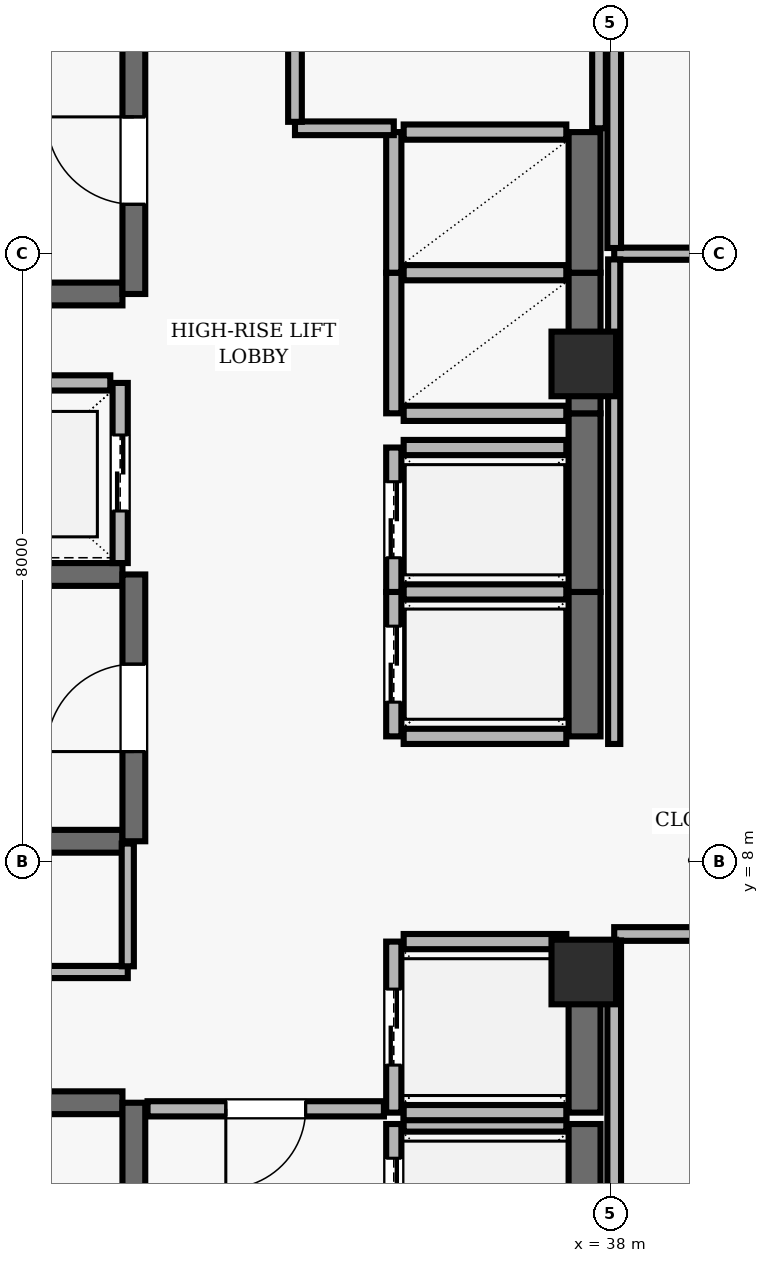
"""IFC4 building model, lengths in metres.
Left out: names, types, materials, properties, quantities, classifications, styles, units other than length and angle.
Written with IfcOpenShell. Run it as: python <this file> out.ifc"""

import sys

from ifc_helpers import new_model, si_unit, direction, frame, frame_2d, origin, origin_2d, place, context, subcontext, project, spatial, rectangle, extrude, element, fill, save


model = new_model("IFC4")
c1 = context("Model", 3, precision=1e-05, world=origin(), true_north=direction((0.0, 1.0)))
c2 = subcontext(c1, "Body", "Model", "MODEL_VIEW")
j1 = project(units=[si_unit("LENGTHUNIT", "METRE"), si_unit("PLANEANGLEUNIT", "RADIAN")], contexts=[c1])
p1 = place(None, origin())
s1 = spatial("IfcSite", under=j1, at=p1, CompositionType="ELEMENT")
p2 = place(p1, origin())
s2 = spatial("IfcBuilding", under=s1, at=p2, CompositionType="ELEMENT")
p3 = place(p2, frame((0.0, 0.0, 259.9)))
s3 = spatial("IfcBuildingStorey", under=s2, at=p3, CompositionType="ELEMENT", Elevation=259.9)
for number, where, z_axis, x_axis in (
    (1, (37.65, 6.55, 0.0), (0.0, 0.0, 1.0), (1.0, 0.0, 0.0)),
    (2, (37.65, 14.55, 0.0), (0.0, 0.0, 1.0), (1.0, 0.0, 0.0)),
):
    element("IfcColumn", number, at=place(p3, frame(where, z_axis=z_axis, x_axis=x_axis)), inside=s3, PredefinedType="COLUMN", context=c2, shape_type="SweptSolid", body=[
        extrude(rectangle(XDim=0.85, YDim=0.85, at=origin_2d()), origin(), (0.0, 0.0, 1.0), 3.9),
    ])
p4 = place(p3, frame((31.58, 4.83, 0.0), z_axis=(0.0, 0.0, 1.0), x_axis=(-1.0, 0.0, 0.0)))
e3 = element("IfcWall", 3, at=p4, inside=s3, PredefinedType="SHEAR", context=c2, shape_type="SweptSolid", body=[
    extrude(rectangle(XDim=8.36, YDim=0.3, at=frame_2d((4.18, 0.0))), origin(), (0.0, 0.0, 1.0), 3.69),
])
p5 = place(p3, frame((31.73, 0.96, 0.0), z_axis=(0.0, 0.0, 1.0), x_axis=(0.0, 1.0, 0.0)))
e4 = element("IfcWall", 4, at=p5, inside=s3, PredefinedType="SHEAR", context=c2, shape_type="SweptSolid", body=[
    extrude(rectangle(XDim=3.87, YDim=0.3, at=frame_2d((1.935, 0.0))), origin(), (0.0, 0.0, 1.0), 3.69),
])
p6 = place(p5, frame((1.54, 0.0, 0.0)))
e5 = element("IfcOpeningElement", 5, at=p6, cuts=e4, PredefinedType="OPENING", context=c2, shape_type="SweptSolid", body=[
    extrude(rectangle(XDim=1.15, YDim=2.15, at=frame_2d((0.575, 1.075))), frame((0.0, 0.16, 0.0), z_axis=(0.0, -1.0, 0.0), x_axis=(1.0, 0.0, 0.0)), (0.0, 0.0, 1.0), 0.32),
])
p7 = place(p3, frame((23.22, 15.47, 0.0), z_axis=(0.0, 0.0, 1.0), x_axis=(1.0, 0.0, 0.0)))
e6 = element("IfcWall", 6, at=p7, inside=s3, PredefinedType="SHEAR", context=c2, shape_type="SweptSolid", body=[
    extrude(rectangle(XDim=8.36, YDim=0.3, at=frame_2d((4.18, 0.0))), origin(), (0.0, 0.0, 1.0), 3.69),
])
p8 = place(p3, frame((31.73, 15.47, 0.0), z_axis=(0.0, 0.0, 1.0), x_axis=(0.0, 1.0, 0.0)))
e7 = element("IfcWall", 7, at=p8, inside=s3, PredefinedType="SHEAR", context=c2, shape_type="SweptSolid", body=[
    extrude(rectangle(XDim=3.51, YDim=0.3, at=frame_2d((1.755, 0.0))), origin(), (0.0, 0.0, 1.0), 3.69),
])
p9 = place(p8, frame((1.18, 0.0, 0.0)))
e8 = element("IfcOpeningElement", 8, at=p9, cuts=e7, PredefinedType="OPENING", context=c2, shape_type="SweptSolid", body=[
    extrude(rectangle(XDim=1.15, YDim=2.15, at=frame_2d((0.575, 1.075))), frame((0.0, 0.16, 0.0), z_axis=(0.0, -1.0, 0.0), x_axis=(1.0, 0.0, 0.0)), (0.0, 0.0, 1.0), 0.32),
])
for number, where, z_axis, x_axis in (
    (9, (31.58, 11.78, 0.0), (0.0, 0.0, 1.0), (-1.0, 0.0, 0.0)),
    (10, (23.22, 8.27, 0.0), (0.0, 0.0, 1.0), (1.0, 0.0, 0.0)),
):
    element("IfcWall", number, at=place(p3, frame(where, z_axis=z_axis, x_axis=x_axis)), inside=s3, PredefinedType="SHEAR", context=c2, shape_type="SweptSolid", body=[
        extrude(rectangle(XDim=8.36, YDim=0.3, at=frame_2d((4.18, 0.0))), origin(), (0.0, 0.0, 1.0), 3.69),
    ])
p10 = place(p3, frame((31.73, 8.27, 0.0), z_axis=(0.0, 0.0, 1.0), x_axis=(0.0, 1.0, 0.0)))
e11 = element("IfcWall", 11, at=p10, inside=s3, PredefinedType="SHEAR", context=c2, shape_type="SweptSolid", body=[
    extrude(rectangle(XDim=3.51, YDim=0.3, at=frame_2d((1.755, 0.0))), origin(), (0.0, 0.0, 1.0), 3.69),
])
p11 = place(p10, frame((1.18, 0.0, 0.0)))
e12 = element("IfcOpeningElement", 12, at=p11, cuts=e11, PredefinedType="OPENING", context=c2, shape_type="SweptSolid", body=[
    extrude(rectangle(XDim=1.15, YDim=2.15, at=frame_2d((0.575, 1.075))), frame((0.0, 0.16, 0.0), z_axis=(0.0, -1.0, 0.0), x_axis=(1.0, 0.0, 0.0)), (0.0, 0.0, 1.0), 0.32),
])
p12 = place(p3, frame((35.15, 4.55, 0.0), z_axis=(0.0, 0.0, 1.0), x_axis=(0.0, -1.0, 0.0)))
e13 = element("IfcWall", 13, at=p12, inside=s3, PredefinedType="SOLIDWALL", context=c2, shape_type="SweptSolid", body=[
    extrude(rectangle(XDim=2.1, YDim=0.2, at=frame_2d((1.05, 0.0))), origin(), (0.0, 0.0, 1.0), 3.69),
])
p13 = place(p12, frame((0.45, 0.0, 0.0)))
e14 = element("IfcOpeningElement", 14, at=p13, cuts=e13, PredefinedType="OPENING", context=c2, shape_type="SweptSolid", body=[
    extrude(rectangle(XDim=1.2, YDim=2.15, at=frame_2d((0.6, 1.075))), frame((0.0, 0.11, 0.0), z_axis=(0.0, -1.0, 0.0), x_axis=(1.0, 0.0, 0.0)), (0.0, 0.0, 1.0), 0.22),
])
p14 = place(p3, frame((37.66, 2.45, 0.0), z_axis=(0.0, 0.0, 1.0), x_axis=(0.0, 1.0, 0.0)))
e15 = element("IfcWall", 15, at=p14, inside=s3, PredefinedType="SHEAR", context=c2, shape_type="SweptSolid", body=[
    extrude(rectangle(XDim=2.1, YDim=0.42, at=frame_2d((1.05, 0.0))), origin(), (0.0, 0.0, 1.0), 3.69),
])
p15 = place(p3, frame((37.42, 4.55, 0.0), z_axis=(0.0, 0.0, 1.0), x_axis=(-1.0, 0.0, 0.0)))
e16 = element("IfcWall", 16, at=p15, inside=s3, PredefinedType="SOLIDWALL", context=c2, shape_type="SweptSolid", body=[
    extrude(rectangle(XDim=2.14, YDim=0.2, at=frame_2d((1.07, 0.0))), origin(), (0.0, 0.0, 1.0), 3.69),
])
p16 = place(p3, frame((35.15, 6.95, 0.0), z_axis=(0.0, 0.0, 1.0), x_axis=(0.0, -1.0, 0.0)))
e17 = element("IfcWall", 17, at=p16, inside=s3, PredefinedType="SOLIDWALL", context=c2, shape_type="SweptSolid", body=[
    extrude(rectangle(XDim=2.25, YDim=0.2, at=frame_2d((1.125, 0.0))), origin(), (0.0, 0.0, 1.0), 3.69),
])
p17 = place(p16, frame((0.625, 0.0, 0.0)))
e18 = element("IfcOpeningElement", 18, at=p17, cuts=e17, PredefinedType="OPENING", context=c2, shape_type="SweptSolid", body=[
    extrude(rectangle(XDim=1.0, YDim=2.1, at=frame_2d((0.5, 1.05))), frame((0.0, 0.11, 0.0), z_axis=(0.0, -1.0, 0.0), x_axis=(1.0, 0.0, 0.0)), (0.0, 0.0, 1.0), 0.22),
])
p18 = place(p3, frame((37.66, 4.7, 0.0), z_axis=(0.0, 0.0, 1.0), x_axis=(0.0, 1.0, 0.0)))
e19 = element("IfcWall", 19, at=p18, inside=s3, PredefinedType="SHEAR", context=c2, shape_type="SweptSolid", body=[
    extrude(rectangle(XDim=2.25, YDim=0.42, at=frame_2d((1.125, 0.0))), origin(), (0.0, 0.0, 1.0), 3.69),
])
for number, where, z_axis, x_axis in (
    (20, (35.28, 4.7, 0.0), (0.0, 0.0, 1.0), (1.0, 0.0, 0.0)),
    (21, (37.42, 6.95, 0.0), (0.0, 0.0, 1.0), (-1.0, 0.0, 0.0)),
):
    element("IfcWall", number, at=place(p3, frame(where, z_axis=z_axis, x_axis=x_axis)), inside=s3, PredefinedType="SOLIDWALL", context=c2, shape_type="SweptSolid", body=[
        extrude(rectangle(XDim=2.14, YDim=0.2, at=frame_2d((1.07, 0.0))), origin(), (0.0, 0.0, 1.0), 3.69),
    ])
p19 = place(p3, frame((35.15, 11.55, 0.0), z_axis=(0.0, 0.0, 1.0), x_axis=(0.0, -1.0, 0.0)))
e22 = element("IfcWall", 22, at=p19, inside=s3, PredefinedType="SOLIDWALL", context=c2, shape_type="SweptSolid", body=[
    extrude(rectangle(XDim=1.9, YDim=0.2, at=frame_2d((0.95, 0.0))), origin(), (0.0, 0.0, 1.0), 3.69),
])
p20 = place(p19, frame((0.45, 0.0, 0.0)))
e23 = element("IfcOpeningElement", 23, at=p20, cuts=e22, PredefinedType="OPENING", context=c2, shape_type="SweptSolid", body=[
    extrude(rectangle(XDim=1.0, YDim=2.1, at=frame_2d((0.5, 1.05))), frame((0.0, 0.11, 0.0), z_axis=(0.0, -1.0, 0.0), x_axis=(1.0, 0.0, 0.0)), (0.0, 0.0, 1.0), 0.22),
])
p21 = place(p3, frame((37.66, 9.65, 0.0), z_axis=(0.0, 0.0, 1.0), x_axis=(0.0, 1.0, 0.0)))
e24 = element("IfcWall", 24, at=p21, inside=s3, PredefinedType="SHEAR", context=c2, shape_type="SweptSolid", body=[
    extrude(rectangle(XDim=1.9, YDim=0.42, at=frame_2d((0.95, 0.0))), origin(), (0.0, 0.0, 1.0), 3.69),
])
for number, where, z_axis, x_axis in (
    (25, (35.28, 9.65, 0.0), (0.0, 0.0, 1.0), (1.0, 0.0, 0.0)),
    (26, (37.42, 11.55, 0.0), (0.0, 0.0, 1.0), (-1.0, 0.0, 0.0)),
):
    element("IfcWall", number, at=place(p3, frame(where, z_axis=z_axis, x_axis=x_axis)), inside=s3, PredefinedType="SOLIDWALL", context=c2, shape_type="SweptSolid", body=[
        extrude(rectangle(XDim=2.14, YDim=0.2, at=frame_2d((1.07, 0.0))), origin(), (0.0, 0.0, 1.0), 3.69),
    ])
p22 = place(p3, frame((35.15, 13.45, 0.0), z_axis=(0.0, 0.0, 1.0), x_axis=(0.0, -1.0, 0.0)))
e27 = element("IfcWall", 27, at=p22, inside=s3, PredefinedType="SOLIDWALL", context=c2, shape_type="SweptSolid", body=[
    extrude(rectangle(XDim=1.9, YDim=0.2, at=frame_2d((0.95, 0.0))), origin(), (0.0, 0.0, 1.0), 3.69),
])
p23 = place(p22, frame((0.45, 0.0, 0.0)))
e28 = element("IfcOpeningElement", 28, at=p23, cuts=e27, PredefinedType="OPENING", context=c2, shape_type="SweptSolid", body=[
    extrude(rectangle(XDim=1.0, YDim=2.1, at=frame_2d((0.5, 1.05))), frame((0.0, 0.11, 0.0), z_axis=(0.0, -1.0, 0.0), x_axis=(1.0, 0.0, 0.0)), (0.0, 0.0, 1.0), 0.22),
])
p24 = place(p3, frame((37.66, 11.55, 0.0), z_axis=(0.0, 0.0, 1.0), x_axis=(0.0, 1.0, 0.0)))
e29 = element("IfcWall", 29, at=p24, inside=s3, PredefinedType="SHEAR", context=c2, shape_type="SweptSolid", body=[
    extrude(rectangle(XDim=2.35, YDim=0.42, at=frame_2d((1.175, 0.0))), origin(), (0.0, 0.0, 1.0), 3.69),
])
p25 = place(p3, frame((37.42, 13.45, 0.0), z_axis=(0.0, 0.0, 1.0), x_axis=(-1.0, 0.0, 0.0)))
e30 = element("IfcWall", 30, at=p25, inside=s3, PredefinedType="SOLIDWALL", context=c2, shape_type="SweptSolid", body=[
    extrude(rectangle(XDim=2.14, YDim=0.2, at=frame_2d((1.07, 0.0))), origin(), (0.0, 0.0, 1.0), 3.69),
])
p26 = place(p3, frame((31.55, 11.93, 0.0), z_axis=(0.0, 0.0, 1.0), x_axis=(0.0, 1.0, 0.0)))
e31 = element("IfcWall", 31, at=p26, inside=s3, PredefinedType="SOLIDWALL", context=c2, shape_type="SweptSolid", body=[
    extrude(rectangle(XDim=2.37, YDim=0.2, at=frame_2d((1.185, 0.0))), origin(), (0.0, 0.0, 1.0), 3.69),
])
p27 = place(p26, frame((0.685, 0.0, 0.0)))
e32 = element("IfcOpeningElement", 32, at=p27, cuts=e31, PredefinedType="OPENING", context=c2, shape_type="SweptSolid", body=[
    extrude(rectangle(XDim=1.0, YDim=2.1, at=frame_2d((0.5, 1.05))), frame((0.0, 0.11, 0.0), z_axis=(0.0, -1.0, 0.0), x_axis=(1.0, 0.0, 0.0)), (0.0, 0.0, 1.0), 0.22),
])
p28 = place(p3, frame((31.42, 14.3, 0.0), z_axis=(0.0, 0.0, 1.0), x_axis=(-1.0, 0.0, 0.0)))
e33 = element("IfcWall", 33, at=p28, inside=s3, PredefinedType="SOLIDWALL", context=c2, shape_type="SweptSolid", body=[
    extrude(rectangle(XDim=2.44, YDim=0.2, at=frame_2d((1.22, 0.0))), origin(), (0.0, 0.0, 1.0), 3.69),
])
p29 = place(p3, frame((35.15, 15.75, 0.0), z_axis=(0.0, 0.0, 1.0), x_axis=(0.0, -1.0, 0.0)))
e34 = element("IfcWall", 34, at=p29, inside=s3, PredefinedType="SOLIDWALL", context=c2, shape_type="SweptSolid", body=[
    extrude(rectangle(XDim=1.85, YDim=0.2, at=frame_2d((0.925, 0.0))), origin(), (0.0, 0.0, 1.0), 3.69),
])
p30 = place(p3, frame((37.66, 13.9, 0.0), z_axis=(0.0, 0.0, 1.0), x_axis=(0.0, 1.0, 0.0)))
e35 = element("IfcWall", 35, at=p30, inside=s3, PredefinedType="SHEAR", context=c2, shape_type="SweptSolid", body=[
    extrude(rectangle(XDim=1.85, YDim=0.42, at=frame_2d((0.925, 0.0))), origin(), (0.0, 0.0, 1.0), 3.69),
])
for number, where, z_axis, x_axis in (
    (36, (35.28, 13.9, 0.0), (0.0, 0.0, 1.0), (1.0, 0.0, 0.0)),
    (37, (37.42, 15.75, 0.0), (0.0, 0.0, 1.0), (-1.0, 0.0, 0.0)),
):
    element("IfcWall", number, at=place(p3, frame(where, z_axis=z_axis, x_axis=x_axis)), inside=s3, PredefinedType="SOLIDWALL", context=c2, shape_type="SweptSolid", body=[
        extrude(rectangle(XDim=2.14, YDim=0.2, at=frame_2d((1.07, 0.0))), origin(), (0.0, 0.0, 1.0), 3.69),
    ])
p31 = place(p3, frame((35.15, 17.6, 0.0), z_axis=(0.0, 0.0, 1.0), x_axis=(0.0, -1.0, 0.0)))
e38 = element("IfcWall", 38, at=p31, inside=s3, PredefinedType="SOLIDWALL", context=c2, shape_type="SweptSolid", body=[
    extrude(rectangle(XDim=1.85, YDim=0.2, at=frame_2d((0.925, 0.0))), origin(), (0.0, 0.0, 1.0), 3.69),
])
p32 = place(p3, frame((37.66, 15.75, 0.0), z_axis=(0.0, 0.0, 1.0), x_axis=(0.0, 1.0, 0.0)))
e39 = element("IfcWall", 39, at=p32, inside=s3, PredefinedType="SHEAR", context=c2, shape_type="SweptSolid", body=[
    extrude(rectangle(XDim=1.85, YDim=0.42, at=frame_2d((0.925, 0.0))), origin(), (0.0, 0.0, 1.0), 3.69),
])
p33 = place(p3, frame((37.42, 17.6, 0.0), z_axis=(0.0, 0.0, 1.0), x_axis=(-1.0, 0.0, 0.0)))
e40 = element("IfcWall", 40, at=p33, inside=s3, PredefinedType="SOLIDWALL", context=c2, shape_type="SweptSolid", body=[
    extrude(rectangle(XDim=2.14, YDim=0.2, at=frame_2d((1.07, 0.0))), origin(), (0.0, 0.0, 1.0), 3.69),
])
p34 = place(p3, frame((31.65, 6.55, 0.0), z_axis=(0.0, 0.0, 1.0), x_axis=(-1.0, 0.0, 0.0)))
e41 = element("IfcWall", 41, at=p34, inside=s3, PredefinedType="PARTITIONING", context=c2, shape_type="SweptSolid", body=[
    extrude(rectangle(XDim=4.75, YDim=0.16, at=frame_2d((2.375, 0.0))), origin(), (0.0, 0.0, 1.0), 3.69),
])
p35 = place(p34, frame((1.935, 0.0, 0.0)))
e42 = element("IfcOpeningElement", 42, at=p35, cuts=e41, PredefinedType="OPENING", context=c2, shape_type="SweptSolid", body=[
    extrude(rectangle(XDim=0.88, YDim=2.1, at=frame_2d((0.44, 1.05))), frame((0.0, 0.09, 0.0), z_axis=(0.0, -1.0, 0.0), x_axis=(1.0, 0.0, 0.0)), (0.0, 0.0, 1.0), 0.18),
])
p36 = place(p3, frame((33.85, 17.65, 0.0), z_axis=(0.0, 0.0, 1.0), x_axis=(1.0, 0.0, 0.0)))
e43 = element("IfcWall", 43, at=p36, inside=s3, PredefinedType="PARTITIONING", context=c2, shape_type="SweptSolid", body=[
    extrude(rectangle(XDim=1.3, YDim=0.18, at=frame_2d((0.65, 0.0))), origin(), (0.0, 0.0, 1.0), 3.69),
])
p37 = place(p3, frame((35.02, 4.75, 0.0), z_axis=(0.0, 0.0, 1.0), x_axis=(-1.0, 0.0, 0.0)))
e44 = element("IfcWall", 44, at=p37, inside=s3, PredefinedType="SOLIDWALL", context=c2, shape_type="SweptSolid", body=[
    extrude(rectangle(XDim=3.11, YDim=0.2, at=frame_2d((1.555, 0.0))), origin(), (0.0, 0.0, 1.0), 3.69),
])
p38 = place(p37, frame((1.03, 0.0, 0.0)))
e45 = element("IfcOpeningElement", 45, at=p38, cuts=e44, PredefinedType="OPENING", context=c2, shape_type="SweptSolid", body=[
    extrude(rectangle(XDim=1.05, YDim=2.15, at=frame_2d((0.525, 1.075))), frame((0.0, 0.11, 0.0), z_axis=(0.0, -1.0, 0.0), x_axis=(1.0, 0.0, 0.0)), (0.0, 0.0, 1.0), 0.22),
])
p39 = place(p3, frame((38.05, 7.05, 0.0), z_axis=(0.0, 0.0, 1.0), x_axis=(1.0, 0.0, 0.0)))
e46 = element("IfcWall", 46, at=p39, inside=s3, PredefinedType="PARTITIONING", context=c2, shape_type="SweptSolid", body=[
    extrude(rectangle(XDim=5.35, YDim=0.18, at=frame_2d((2.675, 0.0))), origin(), (0.0, 0.0, 1.0), 3.69),
])
p40 = place(p39, frame((2.2, 0.0, 0.0)))
e47 = element("IfcOpeningElement", 47, at=p40, cuts=e46, PredefinedType="OPENING", context=c2, shape_type="SweptSolid", body=[
    extrude(rectangle(XDim=0.95, YDim=2.1, at=frame_2d((0.475, 1.05))), frame((0.0, 0.1, 0.0), z_axis=(0.0, -1.0, 0.0), x_axis=(1.0, 0.0, 0.0)), (0.0, 0.0, 1.0), 0.2),
])
p41 = place(p3, frame((43.4, 16.0, 0.0), z_axis=(0.0, 0.0, 1.0), x_axis=(-1.0, 0.0, 0.0)))
e48 = element("IfcWall", 48, at=p41, inside=s3, PredefinedType="PARTITIONING", context=c2, shape_type="SweptSolid", body=[
    extrude(rectangle(XDim=5.35, YDim=0.16, at=frame_2d((2.675, 0.0))), origin(), (0.0, 0.0, 1.0), 3.39),
])
p42 = place(p41, frame((2.225, 0.0, 0.0)))
e49 = element("IfcOpeningElement", 49, at=p42, cuts=e48, PredefinedType="OPENING", context=c2, shape_type="SweptSolid", body=[
    extrude(rectangle(XDim=0.9, YDim=2.1, at=frame_2d((0.45, 1.05))), frame((0.0, 0.09, 0.0), z_axis=(0.0, -1.0, 0.0), x_axis=(1.0, 0.0, 0.0)), (0.0, 0.0, 1.0), 0.18),
])
p43 = place(p3, frame((31.65, 8.24, 0.0), z_axis=(0.0, 0.0, 1.0), x_axis=(0.0, -1.0, 0.0)))
e50 = element("IfcWall", 50, at=p43, inside=s3, PredefinedType="PARTITIONING", context=c2, shape_type="SweptSolid", body=[
    extrude(rectangle(XDim=1.615, YDim=0.16, at=frame_2d((0.808, 0.0))), origin(), (0.0, 0.0, 1.0), 3.69),
])
p44 = place(p3, frame((33.85, 17.735, 0.0), z_axis=(0.0, 0.0, 1.0), x_axis=(0.0, 1.0, 0.0)))
e51 = element("IfcWall", 51, at=p44, inside=s3, PredefinedType="PARTITIONING", context=c2, shape_type="SweptSolid", body=[
    extrude(rectangle(XDim=2.93, YDim=0.18, at=frame_2d((1.465, 0.0))), origin(), (0.0, 0.0, 1.0), 3.69),
])
p45 = place(p44, frame((0.99, 0.0, 0.0)))
e52 = element("IfcOpeningElement", 52, at=p45, cuts=e51, PredefinedType="OPENING", context=c2, shape_type="SweptSolid", body=[
    extrude(rectangle(XDim=0.95, YDim=2.1, at=frame_2d((0.475, 1.05))), frame((0.0, 0.1, 0.0), z_axis=(0.0, -1.0, 0.0), x_axis=(1.0, 0.0, 0.0)), (0.0, 0.0, 1.0), 0.2),
])
p46 = place(p3, frame((37.85, 17.65, 0.0), z_axis=(0.0, 0.0, 1.0), x_axis=(0.0, 1.0, 0.0)))
e53 = element("IfcWall", 53, at=p46, inside=s3, PredefinedType="PARTITIONING", context=c2, shape_type="SweptSolid", body=[
    extrude(rectangle(XDim=3.015, YDim=0.18, at=frame_2d((1.508, 0.0))), origin(), (0.0, 0.0, 1.0), 3.227),
])
p47 = place(p3, frame((38.05, 6.965, 0.0), z_axis=(0.0, 0.0, 1.0), x_axis=(0.0, -1.0, 0.0)))
e54 = element("IfcWall", 54, at=p47, inside=s3, PredefinedType="PARTITIONING", context=c2, shape_type="SweptSolid", body=[
    extrude(rectangle(XDim=6.832, YDim=0.18, at=frame_2d((3.416, 0.0))), origin(), (0.0, 0.0, 1.0), 3.227),
])
p48 = place(p3, frame((38.05, 15.925, 0.0), z_axis=(0.0, 0.0, 1.0), x_axis=(0.0, -1.0, 0.0)))
e55 = element("IfcWall", 55, at=p48, inside=s3, PredefinedType="PARTITIONING", context=c2, shape_type="SweptSolid", body=[
    extrude(rectangle(XDim=6.375, YDim=0.16, at=frame_2d((3.188, 0.0))), origin(), (0.0, 0.0, 1.0), 3.227),
])
p49 = place(p3, frame((38.05, 23.918, 0.0), z_axis=(0.0, 0.0, 1.0), x_axis=(0.0, -1.0, 0.0)))
e56 = element("IfcWall", 56, at=p49, inside=s3, PredefinedType="PARTITIONING", context=c2, shape_type="SweptSolid", body=[
    extrude(rectangle(XDim=7.843, YDim=0.18, at=frame_2d((3.921, 0.0))), origin(), (0.0, 0.0, 1.0), 3.227),
])
p50 = place(p9, origin())
e57 = element("IfcDoor", 57, at=p50, inside=s3, OperationType="SINGLE_SWING_RIGHT", PredefinedType="DOOR", context=c2, shape_type="SweptSolid", body=[
    extrude(rectangle(XDim=1.15, YDim=2.15, at=frame_2d((0.575, 1.075))), frame((0.0, 0.025, 0.0), z_axis=(0.0, -1.0, 0.0), x_axis=(1.0, 0.0, 0.0)), (0.0, 0.0, 1.0), 0.05),
])
fill(e8, e57)
p51 = place(p11, origin())
e58 = element("IfcDoor", 58, at=p51, inside=s3, OperationType="SINGLE_SWING_LEFT", PredefinedType="DOOR", context=c2, shape_type="SweptSolid", body=[
    extrude(rectangle(XDim=1.15, YDim=2.15, at=frame_2d((0.575, 1.075))), frame((0.0, 0.025, 0.0), z_axis=(0.0, -1.0, 0.0), x_axis=(1.0, 0.0, 0.0)), (0.0, 0.0, 1.0), 0.05),
])
fill(e12, e58)
p52 = place(p13, origin())
e59 = element("IfcDoor", 59, at=p52, inside=s3, OperationType="DOUBLE_DOOR_SLIDING", PredefinedType="DOOR", context=c2, shape_type="SweptSolid", body=[
    extrude(rectangle(XDim=1.2, YDim=2.15, at=frame_2d((0.6, 1.075))), frame((0.0, 0.025, 0.0), z_axis=(0.0, -1.0, 0.0), x_axis=(1.0, 0.0, 0.0)), (0.0, 0.0, 1.0), 0.05),
])
fill(e14, e59)
p53 = place(p17, origin())
e60 = element("IfcDoor", 60, at=p53, inside=s3, OperationType="DOUBLE_DOOR_SLIDING", PredefinedType="DOOR", context=c2, shape_type="SweptSolid", body=[
    extrude(rectangle(XDim=1.0, YDim=2.1, at=frame_2d((0.5, 1.05))), frame((0.0, 0.025, 0.0), z_axis=(0.0, -1.0, 0.0), x_axis=(1.0, 0.0, 0.0)), (0.0, 0.0, 1.0), 0.05),
])
fill(e18, e60)
p54 = place(p20, origin())
e61 = element("IfcDoor", 61, at=p54, inside=s3, OperationType="DOUBLE_DOOR_SLIDING", PredefinedType="DOOR", context=c2, shape_type="SweptSolid", body=[
    extrude(rectangle(XDim=1.0, YDim=2.1, at=frame_2d((0.5, 1.05))), frame((0.0, 0.025, 0.0), z_axis=(0.0, -1.0, 0.0), x_axis=(1.0, 0.0, 0.0)), (0.0, 0.0, 1.0), 0.05),
])
fill(e23, e61)
p55 = place(p23, origin())
e62 = element("IfcDoor", 62, at=p55, inside=s3, OperationType="DOUBLE_DOOR_SLIDING", PredefinedType="DOOR", context=c2, shape_type="SweptSolid", body=[
    extrude(rectangle(XDim=1.0, YDim=2.1, at=frame_2d((0.5, 1.05))), frame((0.0, 0.025, 0.0), z_axis=(0.0, -1.0, 0.0), x_axis=(1.0, 0.0, 0.0)), (0.0, 0.0, 1.0), 0.05),
])
fill(e28, e62)
p56 = place(p27, origin())
e63 = element("IfcDoor", 63, at=p56, inside=s3, OperationType="DOUBLE_DOOR_SLIDING", PredefinedType="DOOR", context=c2, shape_type="SweptSolid", body=[
    extrude(rectangle(XDim=1.0, YDim=2.1, at=frame_2d((0.5, 1.05))), frame((0.0, 0.025, 0.0), z_axis=(0.0, -1.0, 0.0), x_axis=(1.0, 0.0, 0.0)), (0.0, 0.0, 1.0), 0.05),
])
fill(e32, e63)
p57 = place(p38, origin())
e64 = element("IfcDoor", 64, at=p57, inside=s3, OperationType="SINGLE_SWING_RIGHT", PredefinedType="DOOR", context=c2, shape_type="SweptSolid", body=[
    extrude(rectangle(XDim=1.05, YDim=2.15, at=frame_2d((0.525, 1.075))), frame((0.0, 0.025, 0.0), z_axis=(0.0, -1.0, 0.0), x_axis=(1.0, 0.0, 0.0)), (0.0, 0.0, 1.0), 0.05),
])
fill(e45, e64)
save(model, sys.argv[1])
